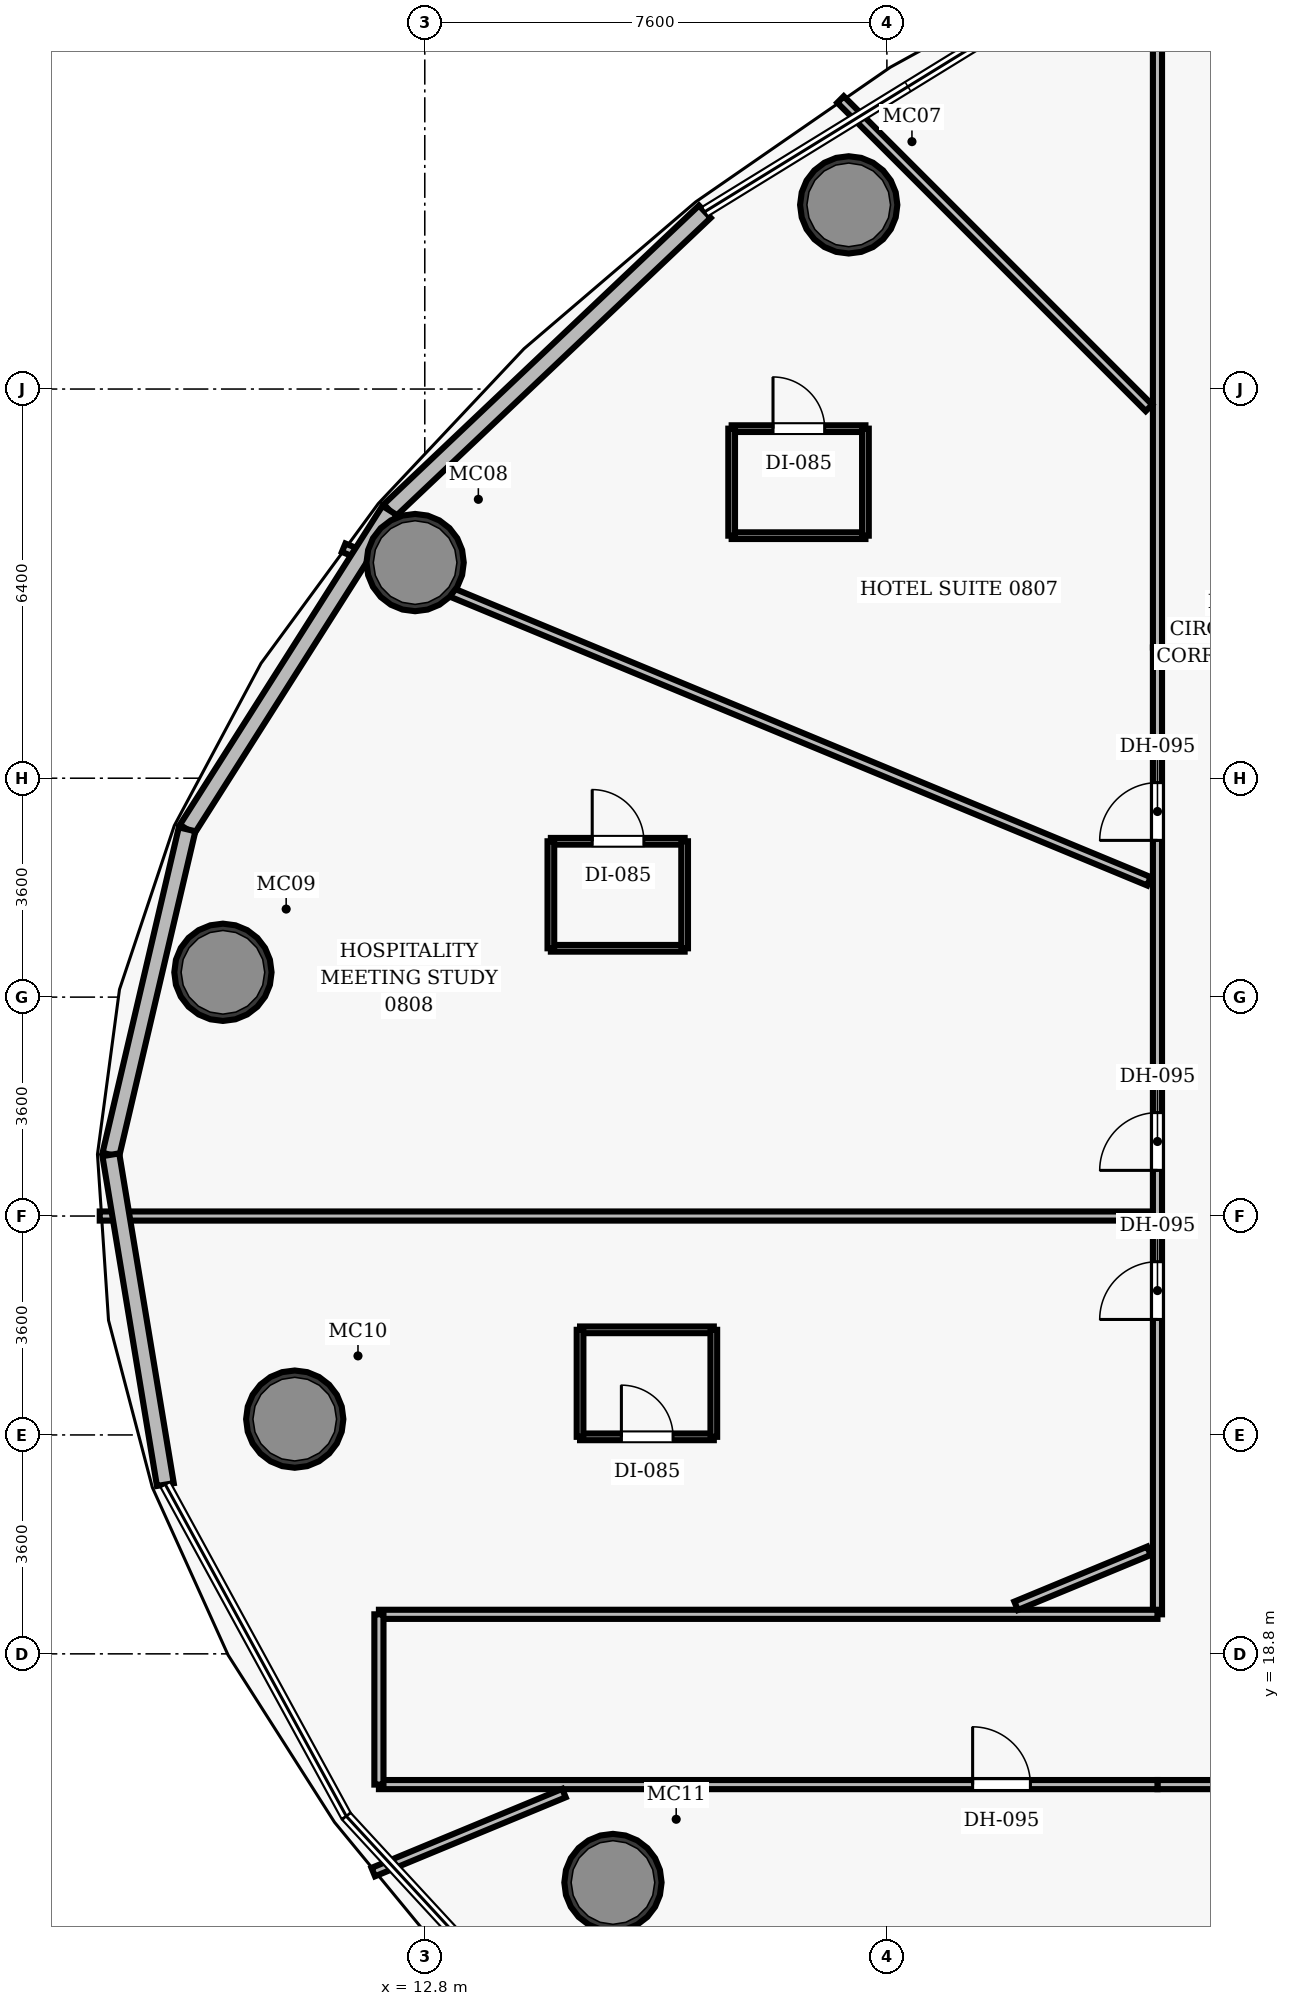
"""IFC4 building model, lengths in metres.
Left out: names, types, materials, properties, quantities, classifications, styles, units other than length and angle.
Written with IfcOpenShell. Run it as: python <this file> out.ifc"""

import sys

from ifc_helpers import new_model, si_unit, direction, frame, frame_2d, origin, origin_2d, place, context, subcontext, project, spatial, rectangle, hollow_circle, extrude, element, fill, save


model = new_model("IFC4")
c1 = context("Model", 3, precision=1e-05, world=origin(), true_north=direction((0.0, 1.0)))
c2 = subcontext(c1, "Body", "Model", "MODEL_VIEW")
j1 = project(units=[si_unit("LENGTHUNIT", "METRE"), si_unit("PLANEANGLEUNIT", "RADIAN")], contexts=[c1])
p1 = place(None, origin())
s1 = spatial("IfcSite", under=j1, at=p1, CompositionType="ELEMENT")
p2 = place(p1, origin())
s2 = spatial("IfcBuilding", under=s1, at=p2, CompositionType="ELEMENT")
p3 = place(p2, frame((0.0, 0.0, 44.9)))
s3 = spatial("IfcBuildingStorey", under=s2, at=p3, CompositionType="ELEMENT", Elevation=44.9)
for number, where, z_axis, x_axis in (
    (1, (19.772, 42.629, 0.0), (0.0, 0.0, 1.0), (1.0, 0.0, 0.0)),
    (2, (12.641, 36.746, 0.0), (0.0, 0.0, 1.0), (1.0, 0.0, 0.0)),
    (3, (9.48, 30.008, 0.0), (0.0, 0.0, 1.0), (1.0, 0.0, 0.0)),
    (4, (10.661, 22.66, 0.0), (0.0, 0.0, 1.0), (1.0, 0.0, 0.0)),
    (5, (15.895, 15.04, 0.0), (0.0, 0.0, 1.0), (1.0, 0.0, 0.0)),
):
    element("IfcColumn", number, at=place(p3, frame(where, z_axis=z_axis, x_axis=x_axis)), inside=s3, PredefinedType="COLUMN", context=c2, shape_type="SweptSolid", body=[
        extrude(hollow_circle(Radius=0.8, WallThickness=0.06, at=origin_2d()), origin(), (0.0, 0.0, 1.0), 3.5),
    ])
p4 = place(p3, frame((24.85, 16.65, 0.0), z_axis=(0.0, 0.0, 1.0), x_axis=(1.0, 0.0, 0.0)))
e6 = element("IfcWall", 6, at=p4, inside=s3, PredefinedType="PARTITIONING", context=c2, shape_type="SweptSolid", body=[
    extrude(rectangle(XDim=23.5, YDim=0.15, at=frame_2d((11.75, 0.0))), origin(), (0.0, 0.0, 1.0), 2.6),
])
p5 = place(p4, frame((7.505, 0.0, 0.0)))
e7 = element("IfcOpeningElement", 7, at=p5, cuts=e6, PredefinedType="OPENING", context=c2, shape_type="SweptSolid", body=[
    extrude(rectangle(XDim=0.95, YDim=2.15, at=frame_2d((0.475, 1.075))), frame((0.0, 0.085, 0.0), z_axis=(0.0, -1.0, 0.0), x_axis=(1.0, 0.0, 0.0)), (0.0, 0.0, 1.0), 0.17),
])
p6 = place(p4, frame((11.391, 0.0, 0.0)))
e8 = element("IfcOpeningElement", 8, at=p6, cuts=e6, PredefinedType="OPENING", context=c2, shape_type="SweptSolid", body=[
    extrude(rectangle(XDim=0.95, YDim=2.15, at=frame_2d((0.475, 1.075))), frame((0.0, 0.085, 0.0), z_axis=(0.0, -1.0, 0.0), x_axis=(1.0, 0.0, 0.0)), (0.0, 0.0, 1.0), 0.17),
])
p7 = place(p4, frame((14.636, 0.0, 0.0)))
e9 = element("IfcOpeningElement", 9, at=p7, cuts=e6, PredefinedType="OPENING", context=c2, shape_type="SweptSolid", body=[
    extrude(rectangle(XDim=0.95, YDim=2.15, at=frame_2d((0.475, 1.075))), frame((0.0, 0.085, 0.0), z_axis=(0.0, -1.0, 0.0), x_axis=(1.0, 0.0, 0.0)), (0.0, 0.0, 1.0), 0.17),
])
p8 = place(p4, frame((17.845, 0.0, 0.0)))
e10 = element("IfcOpeningElement", 10, at=p8, cuts=e6, PredefinedType="OPENING", context=c2, shape_type="SweptSolid", body=[
    extrude(rectangle(XDim=0.95, YDim=2.15, at=frame_2d((0.475, 1.075))), frame((0.0, 0.085, 0.0), z_axis=(0.0, -1.0, 0.0), x_axis=(1.0, 0.0, 0.0)), (0.0, 0.0, 1.0), 0.17),
])
p9 = place(p3, frame((24.85, 19.45, 0.0), z_axis=(0.0, 0.0, 1.0), x_axis=(0.0, 1.0, 0.0)))
e11 = element("IfcWall", 11, at=p9, inside=s3, PredefinedType="PARTITIONING", context=c2, shape_type="SweptSolid", body=[
    extrude(rectangle(XDim=15.9, YDim=0.15, at=frame_2d((7.95, 0.0))), origin(), (0.0, 0.0, 1.0), 2.6),
])
p10 = place(p9, frame((12.728, 0.0, 0.0)))
e12 = element("IfcOpeningElement", 12, at=p10, cuts=e11, PredefinedType="OPENING", context=c2, shape_type="SweptSolid", body=[
    extrude(rectangle(XDim=0.95, YDim=2.15, at=frame_2d((0.475, 1.075))), frame((0.0, 0.085, 0.0), z_axis=(0.0, -1.0, 0.0), x_axis=(1.0, 0.0, 0.0)), (0.0, 0.0, 1.0), 0.17),
])
p11 = place(p9, frame((7.301, 0.0, 0.0)))
e13 = element("IfcOpeningElement", 13, at=p11, cuts=e11, PredefinedType="OPENING", context=c2, shape_type="SweptSolid", body=[
    extrude(rectangle(XDim=0.95, YDim=2.15, at=frame_2d((0.475, 1.075))), frame((0.0, 0.085, 0.0), z_axis=(0.0, -1.0, 0.0), x_axis=(1.0, 0.0, 0.0)), (0.0, 0.0, 1.0), 0.17),
])
p12 = place(p9, frame((4.849, 0.0, 0.0)))
e14 = element("IfcOpeningElement", 14, at=p12, cuts=e11, PredefinedType="OPENING", context=c2, shape_type="SweptSolid", body=[
    extrude(rectangle(XDim=0.95, YDim=2.15, at=frame_2d((0.475, 1.075))), frame((0.0, 0.085, 0.0), z_axis=(0.0, -1.0, 0.0), x_axis=(1.0, 0.0, 0.0)), (0.0, 0.0, 1.0), 0.17),
])
p13 = place(p3, frame((12.046, 19.45, 0.0), z_axis=(0.0, 0.0, 1.0), x_axis=(1.0, 0.0, 0.0)))
e15 = element("IfcWall", 15, at=p13, inside=s3, PredefinedType="PARTITIONING", context=c2, shape_type="SweptSolid", body=[
    extrude(rectangle(XDim=12.804, YDim=0.15, at=frame_2d((6.402, 0.0))), origin(), (0.0, 0.0, 1.0), 2.6),
])
p14 = place(p3, frame((12.046, 16.65, 0.0), z_axis=(0.0, 0.0, 1.0), x_axis=(1.0, 0.0, 0.0)))
e16 = element("IfcWall", 16, at=p14, inside=s3, PredefinedType="PARTITIONING", context=c2, shape_type="SweptSolid", body=[
    extrude(rectangle(XDim=12.804, YDim=0.15, at=frame_2d((6.402, 0.0))), origin(), (0.0, 0.0, 1.0), 2.6),
])
p15 = place(p14, frame((9.764, 0.0, 0.0)))
e17 = element("IfcOpeningElement", 17, at=p15, cuts=e16, PredefinedType="OPENING", context=c2, shape_type="SweptSolid", body=[
    extrude(rectangle(XDim=0.95, YDim=2.15, at=frame_2d((0.475, 1.075))), frame((0.0, 0.085, 0.0), z_axis=(0.0, -1.0, 0.0), x_axis=(1.0, 0.0, 0.0)), (0.0, 0.0, 1.0), 0.17),
])
p16 = place(p3, frame((12.046, 16.65, 0.0), z_axis=(0.0, 0.0, 1.0), x_axis=(0.0, 1.0, 0.0)))
e18 = element("IfcWall", 18, at=p16, inside=s3, PredefinedType="PARTITIONING", context=c2, shape_type="SweptSolid", body=[
    extrude(rectangle(XDim=2.8, YDim=0.15, at=frame_2d((1.4, 0.0))), origin(), (0.0, 0.0, 1.0), 2.6),
])
p17 = place(p3, frame((24.85, 35.35, 0.0), z_axis=(0.0, 0.0, 1.0), x_axis=(0.0, 1.0, 0.0)))
e19 = element("IfcWall", 19, at=p17, inside=s3, PredefinedType="PARTITIONING", context=c2, shape_type="SweptSolid", body=[
    extrude(rectangle(XDim=10.15, YDim=0.15, at=frame_2d((5.075, 0.0))), origin(), (0.0, 0.0, 1.0), 2.6),
])
p18 = place(p3, frame((24.71, 39.29, 0.0), z_axis=(0.0, 0.0, 1.0), x_axis=(-0.707106781187, 0.707106781187, 0.0)))
e20 = element("IfcWall", 20, at=p18, inside=s3, PredefinedType="PARTITIONING", context=c2, shape_type="SweptSolid", body=[
    extrude(rectangle(XDim=7.173, YDim=0.15, at=frame_2d((3.587, 0.0))), origin(), (0.0, 0.0, 1.0), 2.6),
])
p19 = place(p3, frame((24.71, 31.505, 0.0), z_axis=(0.0, 0.0, 1.0), x_axis=(-0.923878587867, 0.382685712931, 0.0)))
e21 = element("IfcWall", 21, at=p19, inside=s3, PredefinedType="PARTITIONING", context=c2, shape_type="SweptSolid", body=[
    extrude(rectangle(XDim=14.335, YDim=0.15, at=frame_2d((7.167, 0.0))), origin(), (0.0, 0.0, 1.0), 2.6),
])
p20 = place(p3, frame((24.71, 26.0, 0.0), z_axis=(0.0, 0.0, 1.0), x_axis=(-1.0, 0.0, 0.0)))
e22 = element("IfcWall", 22, at=p20, inside=s3, PredefinedType="PARTITIONING", context=c2, shape_type="SweptSolid", body=[
    extrude(rectangle(XDim=17.256, YDim=0.15, at=frame_2d((8.628, 0.0))), origin(), (0.0, 0.0, 1.0), 2.6),
])
p21 = place(p3, frame((24.71, 20.495, 0.0), z_axis=(0.0, 0.0, 1.0), x_axis=(-0.923887247067, -0.382664807249, 0.0)))
e23 = element("IfcWall", 23, at=p21, inside=s3, PredefinedType="PARTITIONING", context=c2, shape_type="SweptSolid", body=[
    extrude(rectangle(XDim=2.365, YDim=0.15, at=frame_2d((1.183, 0.0))), origin(), (0.0, 0.0, 1.0), 2.6),
])
p22 = place(p3, frame((15.089, 16.51, 0.0), z_axis=(0.0, 0.0, 1.0), x_axis=(-0.923864318354, -0.382720160526, 0.0)))
e24 = element("IfcWall", 24, at=p22, inside=s3, PredefinedType="PARTITIONING", context=c2, shape_type="SweptSolid", body=[
    extrude(rectangle(XDim=3.395, YDim=0.15, at=frame_2d((1.698, 0.0))), origin(), (0.0, 0.0, 1.0), 2.6),
])
p23 = place(p3, frame((28.51, 16.51, 0.0), z_axis=(0.0, 0.0, 1.0), x_axis=(-0.707106781187, -0.707106781187, 0.0)))
e25 = element("IfcWall", 25, at=p23, inside=s3, PredefinedType="PARTITIONING", context=c2, shape_type="SweptSolid", body=[
    extrude(rectangle(XDim=12.215, YDim=0.15, at=frame_2d((6.107, 0.0))), origin(), (0.0, 0.0, 1.0), 2.6),
])
p24 = place(p3, frame((17.847, 37.189, 0.0), z_axis=(0.0, 0.0, 1.0), x_axis=(1.0, 0.0, 0.0)))
e26 = element("IfcWall", 26, at=p24, inside=s3, PredefinedType="PARTITIONING", context=c2, shape_type="SweptSolid", body=[
    extrude(rectangle(XDim=2.2, YDim=0.11, at=frame_2d((1.1, 0.0))), origin(), (0.0, 0.0, 1.0), 2.6),
])
p25 = place(p3, frame((17.847, 38.949, 0.0), z_axis=(0.0, 0.0, 1.0), x_axis=(1.0, 0.0, 0.0)))
e27 = element("IfcWall", 27, at=p25, inside=s3, PredefinedType="PARTITIONING", context=c2, shape_type="SweptSolid", body=[
    extrude(rectangle(XDim=2.2, YDim=0.11, at=frame_2d((1.1, 0.0))), origin(), (0.0, 0.0, 1.0), 2.6),
])
p26 = place(p25, frame((0.68, 0.0, 0.0)))
e28 = element("IfcOpeningElement", 28, at=p26, cuts=e27, PredefinedType="OPENING", context=c2, shape_type="SweptSolid", body=[
    extrude(rectangle(XDim=0.85, YDim=2.1, at=frame_2d((0.425, 1.05))), frame((0.0, 0.065, 0.0), z_axis=(0.0, -1.0, 0.0), x_axis=(1.0, 0.0, 0.0)), (0.0, 0.0, 1.0), 0.13),
])
for number, where, z_axis, x_axis in (
    (29, (17.847, 37.189, 0.0), (0.0, 0.0, 1.0), (0.0, 1.0, 0.0)),
    (30, (20.047, 37.189, 0.0), (0.0, 0.0, 1.0), (0.0, 1.0, 0.0)),
):
    element("IfcWall", number, at=place(p3, frame(where, z_axis=z_axis, x_axis=x_axis)), inside=s3, PredefinedType="PARTITIONING", context=c2, shape_type="SweptSolid", body=[
        extrude(rectangle(XDim=1.76, YDim=0.11, at=frame_2d((0.88, 0.0))), origin(), (0.0, 0.0, 1.0), 2.6),
    ])
p27 = place(p3, frame((14.874, 30.403, 0.0), z_axis=(0.0, 0.0, 1.0), x_axis=(1.0, 0.0, 0.0)))
e31 = element("IfcWall", 31, at=p27, inside=s3, PredefinedType="PARTITIONING", context=c2, shape_type="SweptSolid", body=[
    extrude(rectangle(XDim=2.2, YDim=0.11, at=frame_2d((1.1, 0.0))), origin(), (0.0, 0.0, 1.0), 2.6),
])
p28 = place(p3, frame((14.874, 32.163, 0.0), z_axis=(0.0, 0.0, 1.0), x_axis=(1.0, 0.0, 0.0)))
e32 = element("IfcWall", 32, at=p28, inside=s3, PredefinedType="PARTITIONING", context=c2, shape_type="SweptSolid", body=[
    extrude(rectangle(XDim=2.2, YDim=0.11, at=frame_2d((1.1, 0.0))), origin(), (0.0, 0.0, 1.0), 2.6),
])
p29 = place(p28, frame((0.68, 0.0, 0.0)))
e33 = element("IfcOpeningElement", 33, at=p29, cuts=e32, PredefinedType="OPENING", context=c2, shape_type="SweptSolid", body=[
    extrude(rectangle(XDim=0.85, YDim=2.1, at=frame_2d((0.425, 1.05))), frame((0.0, 0.065, 0.0), z_axis=(0.0, -1.0, 0.0), x_axis=(1.0, 0.0, 0.0)), (0.0, 0.0, 1.0), 0.13),
])
for number, where, z_axis, x_axis in (
    (34, (14.874, 30.403, 0.0), (0.0, 0.0, 1.0), (0.0, 1.0, 0.0)),
    (35, (17.074, 30.403, 0.0), (0.0, 0.0, 1.0), (0.0, 1.0, 0.0)),
):
    element("IfcWall", number, at=place(p3, frame(where, z_axis=z_axis, x_axis=x_axis)), inside=s3, PredefinedType="PARTITIONING", context=c2, shape_type="SweptSolid", body=[
        extrude(rectangle(XDim=1.76, YDim=0.11, at=frame_2d((0.88, 0.0))), origin(), (0.0, 0.0, 1.0), 2.6),
    ])
p30 = place(p3, frame((15.354, 22.369, 0.0), z_axis=(0.0, 0.0, 1.0), x_axis=(1.0, 0.0, 0.0)))
e36 = element("IfcWall", 36, at=p30, inside=s3, PredefinedType="PARTITIONING", context=c2, shape_type="SweptSolid", body=[
    extrude(rectangle(XDim=2.2, YDim=0.11, at=frame_2d((1.1, 0.0))), origin(), (0.0, 0.0, 1.0), 2.6),
])
p31 = place(p30, frame((0.68, 0.0, 0.0)))
e37 = element("IfcOpeningElement", 37, at=p31, cuts=e36, PredefinedType="OPENING", context=c2, shape_type="SweptSolid", body=[
    extrude(rectangle(XDim=0.85, YDim=2.1, at=frame_2d((0.425, 1.05))), frame((0.0, 0.065, 0.0), z_axis=(0.0, -1.0, 0.0), x_axis=(1.0, 0.0, 0.0)), (0.0, 0.0, 1.0), 0.13),
])
p32 = place(p3, frame((15.354, 24.129, 0.0), z_axis=(0.0, 0.0, 1.0), x_axis=(1.0, 0.0, 0.0)))
e38 = element("IfcWall", 38, at=p32, inside=s3, PredefinedType="PARTITIONING", context=c2, shape_type="SweptSolid", body=[
    extrude(rectangle(XDim=2.2, YDim=0.11, at=frame_2d((1.1, 0.0))), origin(), (0.0, 0.0, 1.0), 2.6),
])
for number, where, z_axis, x_axis in (
    (39, (15.354, 22.369, 0.0), (0.0, 0.0, 1.0), (0.0, 1.0, 0.0)),
    (40, (17.553, 22.369, 0.0), (0.0, 0.0, 1.0), (0.0, 1.0, 0.0)),
):
    element("IfcWall", number, at=place(p3, frame(where, z_axis=z_axis, x_axis=x_axis)), inside=s3, PredefinedType="PARTITIONING", context=c2, shape_type="SweptSolid", body=[
        extrude(rectangle(XDim=1.76, YDim=0.11, at=frame_2d((0.88, 0.0))), origin(), (0.0, 0.0, 1.0), 2.6),
    ])
p33 = place(p3, frame((12.221, 37.604, 0.0), z_axis=(0.0, 0.0, 1.0), x_axis=(0.725838608764, 0.687865040562, 0.0)))
e41 = element("IfcWall", 41, at=p33, inside=s3, PredefinedType="SOLIDWALL", context=c2, shape_type="SweptSolid", body=[
    extrude(rectangle(XDim=7.143, YDim=0.28, at=frame_2d((3.571, 0.0))), origin(), (0.0, 0.0, 1.0), 3.25),
])
p34 = place(p3, frame((8.891, 32.36, 0.0), z_axis=(0.0, 0.0, 1.0), x_axis=(0.536135283321, 0.844132073776, 0.0)))
e42 = element("IfcWall", 42, at=p34, inside=s3, PredefinedType="SOLIDWALL", context=c2, shape_type="SweptSolid", body=[
    extrude(rectangle(XDim=6.212, YDim=0.28, at=frame_2d((3.106, 0.0))), origin(), (0.0, 0.0, 1.0), 3.25),
])
p35 = place(p3, frame((7.637, 27.007, 0.0), z_axis=(0.0, 0.0, 1.0), x_axis=(0.228140672465, 0.973628180348, 0.0)))
e43 = element("IfcWall", 43, at=p35, inside=s3, PredefinedType="SOLIDWALL", context=c2, shape_type="SweptSolid", body=[
    extrude(rectangle(XDim=5.497, YDim=0.28, at=frame_2d((2.749, 0.0))), origin(), (0.0, 0.0, 1.0), 3.25),
])
p36 = place(p3, frame((8.533, 21.583, 0.0), z_axis=(0.0, 0.0, 1.0), x_axis=(-0.163116967398, 0.986606737736, 0.0)))
e44 = element("IfcWall", 44, at=p36, inside=s3, PredefinedType="SOLIDWALL", context=c2, shape_type="SweptSolid", body=[
    extrude(rectangle(XDim=5.498, YDim=0.28, at=frame_2d((2.749, 0.0))), origin(), (0.0, 0.0, 1.0), 3.25),
])
p37 = place(p10, origin())
e45 = element("IfcDoor", 45, at=p37, inside=s3, OperationType="SINGLE_SWING_LEFT", PredefinedType="DOOR", context=c2, shape_type="SweptSolid", body=[
    extrude(rectangle(XDim=0.95, YDim=2.15, at=frame_2d((0.475, 1.075))), frame((0.0, 0.025, 0.0), z_axis=(0.0, -1.0, 0.0), x_axis=(1.0, 0.0, 0.0)), (0.0, 0.0, 1.0), 0.05),
])
fill(e12, e45)
p38 = place(p26, origin())
e46 = element("IfcDoor", 46, at=p38, inside=s3, OperationType="SINGLE_SWING_LEFT", PredefinedType="DOOR", context=c2, shape_type="SweptSolid", body=[
    extrude(rectangle(XDim=0.85, YDim=2.1, at=frame_2d((0.425, 1.05))), frame((0.0, 0.025, 0.0), z_axis=(0.0, -1.0, 0.0), x_axis=(1.0, 0.0, 0.0)), (0.0, 0.0, 1.0), 0.05),
])
fill(e28, e46)
p39 = place(p11, origin())
e47 = element("IfcDoor", 47, at=p39, inside=s3, OperationType="SINGLE_SWING_LEFT", PredefinedType="DOOR", context=c2, shape_type="SweptSolid", body=[
    extrude(rectangle(XDim=0.95, YDim=2.15, at=frame_2d((0.475, 1.075))), frame((0.0, 0.025, 0.0), z_axis=(0.0, -1.0, 0.0), x_axis=(1.0, 0.0, 0.0)), (0.0, 0.0, 1.0), 0.05),
])
fill(e13, e47)
p40 = place(p29, origin())
e48 = element("IfcDoor", 48, at=p40, inside=s3, OperationType="SINGLE_SWING_LEFT", PredefinedType="DOOR", context=c2, shape_type="SweptSolid", body=[
    extrude(rectangle(XDim=0.85, YDim=2.1, at=frame_2d((0.425, 1.05))), frame((0.0, 0.025, 0.0), z_axis=(0.0, -1.0, 0.0), x_axis=(1.0, 0.0, 0.0)), (0.0, 0.0, 1.0), 0.05),
])
fill(e33, e48)
p41 = place(p12, origin())
e49 = element("IfcDoor", 49, at=p41, inside=s3, OperationType="SINGLE_SWING_LEFT", PredefinedType="DOOR", context=c2, shape_type="SweptSolid", body=[
    extrude(rectangle(XDim=0.95, YDim=2.15, at=frame_2d((0.475, 1.075))), frame((0.0, 0.025, 0.0), z_axis=(0.0, -1.0, 0.0), x_axis=(1.0, 0.0, 0.0)), (0.0, 0.0, 1.0), 0.05),
])
fill(e14, e49)
p42 = place(p31, origin())
e50 = element("IfcDoor", 50, at=p42, inside=s3, OperationType="SINGLE_SWING_LEFT", PredefinedType="DOOR", context=c2, shape_type="SweptSolid", body=[
    extrude(rectangle(XDim=0.85, YDim=2.1, at=frame_2d((0.425, 1.05))), frame((0.0, 0.025, 0.0), z_axis=(0.0, -1.0, 0.0), x_axis=(1.0, 0.0, 0.0)), (0.0, 0.0, 1.0), 0.05),
])
fill(e37, e50)
p43 = place(p15, origin())
e51 = element("IfcDoor", 51, at=p43, inside=s3, OperationType="SINGLE_SWING_LEFT", PredefinedType="DOOR", context=c2, shape_type="SweptSolid", body=[
    extrude(rectangle(XDim=0.95, YDim=2.15, at=frame_2d((0.475, 1.075))), frame((0.0, 0.025, 0.0), z_axis=(0.0, -1.0, 0.0), x_axis=(1.0, 0.0, 0.0)), (0.0, 0.0, 1.0), 0.05),
])
fill(e17, e51)
save(model, sys.argv[1])
